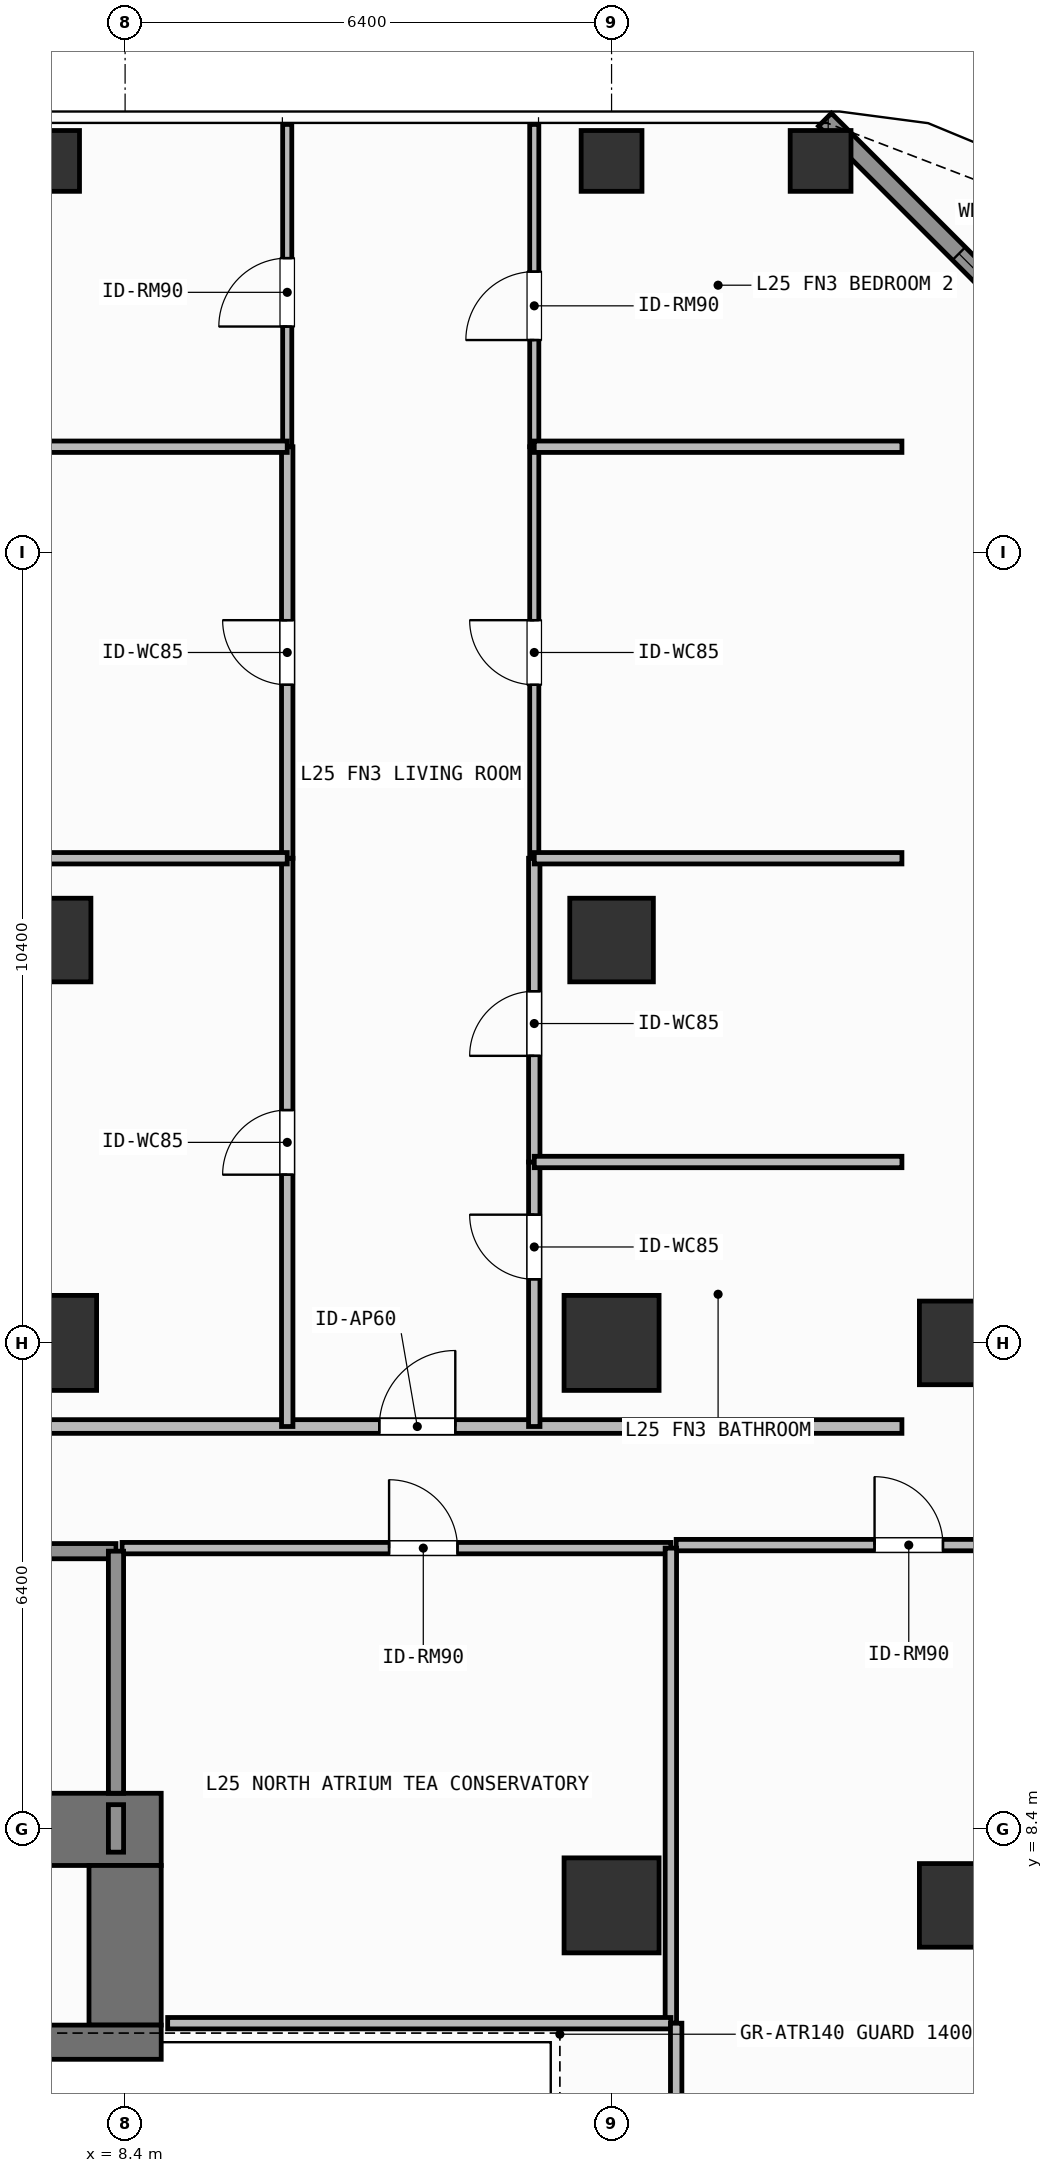
"""IFC4 building model, lengths in metres.
Left out: names, types, materials, properties, quantities, classifications, styles, units other than length and angle.
Written with IfcOpenShell. Run it as: python <this file> out.ifc"""

import sys

from ifc_helpers import new_model, si_unit, direction, frame, frame_2d, origin, origin_2d, place, context, subcontext, project, spatial, rectangle, hollow_rectangle, extrude, element, fill, save


model = new_model("IFC4")
c1 = context("Model", 3, precision=1e-05, world=origin(), true_north=direction((0.0, 1.0)))
c2 = subcontext(c1, "Body", "Model", "MODEL_VIEW")
j1 = project(units=[si_unit("LENGTHUNIT", "METRE"), si_unit("PLANEANGLEUNIT", "RADIAN")], contexts=[c1])
p1 = place(None, origin())
s1 = spatial("IfcSite", under=j1, at=p1, CompositionType="ELEMENT")
p2 = place(p1, origin())
s2 = spatial("IfcBuilding", under=s1, at=p2, CompositionType="ELEMENT")
p3 = place(p2, frame((0.0, 0.0, 100.8)))
s3 = spatial("IfcBuildingStorey", under=s2, at=p3, CompositionType="ELEMENT", Elevation=100.8)
p4 = place(p3, frame((-7.55, 8.4, 0.0), z_axis=(0.0, 0.0, 1.0), x_axis=(1.0, 0.0, 0.0)))
e1 = element("IfcWall", 1, at=p4, inside=s3, PredefinedType="SHEAR", context=c2, shape_type="SweptSolid", body=[
    extrude(rectangle(XDim=16.425, YDim=0.95, at=frame_2d((8.212, 0.0))), origin(), (0.0, 0.0, 1.0), 3.9),
])
p5 = place(p3, frame((8.4, 5.825, 0.0), z_axis=(0.0, 0.0, 1.0), x_axis=(0.0, 1.0, 0.0)))
e2 = element("IfcWall", 2, at=p5, inside=s3, PredefinedType="SHEAR", context=c2, shape_type="SweptSolid", body=[
    extrude(rectangle(XDim=2.1, YDim=0.95, at=frame_2d((1.05, 0.0))), origin(), (0.0, 0.0, 1.0), 3.9),
])
p6 = place(p3, frame((3.045, 5.6, 0.0), z_axis=(0.0, 0.0, 1.0), x_axis=(1.0, 0.0, 0.0)))
e3 = element("IfcWall", 3, at=p6, inside=s3, PredefinedType="SHEAR", context=c2, shape_type="SweptSolid", body=[
    extrude(rectangle(XDim=5.83, YDim=0.45, at=frame_2d((2.915, 0.0))), origin(), (0.0, 0.0, 1.0), 3.9),
])
for number, where, z_axis, x_axis in (
    (4, (7.4, 14.8, 0.0), (0.0, 0.0, 1.0), (1.0, 0.0, 0.0)),
    (5, (14.8, 14.8, 0.0), (0.0, 0.0, 1.0), (1.0, 0.0, 0.0)),
    (6, (14.8, 7.4, 0.0), (0.0, 0.0, 1.0), (1.0, 0.0, 0.0)),
):
    element("IfcColumn", number, at=place(p3, frame(where, z_axis=z_axis, x_axis=x_axis)), inside=s3, PredefinedType="COLUMN", context=c2, shape_type="SweptSolid", body=[
        extrude(rectangle(XDim=1.25, YDim=1.25, at=origin_2d()), origin(), (0.0, 0.0, 1.0), 3.9),
    ])
for number, where, z_axis, x_axis in (
    (7, (19.4, 7.4, 0.0), (0.0, 0.0, 1.0), (1.0, 0.0, 0.0)),
    (8, (19.4, 14.8, 0.0), (0.0, 0.0, 1.0), (1.0, 0.0, 0.0)),
    (9, (7.4, 20.1, 0.0), (0.0, 0.0, 1.0), (1.0, 0.0, 0.0)),
    (10, (14.8, 20.1, 0.0), (0.0, 0.0, 1.0), (1.0, 0.0, 0.0)),
):
    element("IfcColumn", number, at=place(p3, frame(where, z_axis=z_axis, x_axis=x_axis)), inside=s3, PredefinedType="COLUMN", context=c2, shape_type="SweptSolid", body=[
        extrude(rectangle(XDim=1.1, YDim=1.1, at=origin_2d()), origin(), (0.0, 0.0, 1.0), 3.9),
    ])
for number, where, z_axis, x_axis in (
    (11, (17.55, 30.35, 0.0), (0.0, 0.0, 1.0), (1.0, 0.0, 0.0)),
    (12, (7.4, 30.35, 0.0), (0.0, 0.0, 1.0), (1.0, 0.0, 0.0)),
    (13, (14.8, 30.35, 0.0), (0.0, 0.0, 1.0), (1.0, 0.0, 0.0)),
):
    element("IfcColumn", number, at=place(p3, frame(where, z_axis=z_axis, x_axis=x_axis)), inside=s3, PredefinedType="COLUMN", context=c2, shape_type="SweptSolid", body=[
        extrude(hollow_rectangle(XDim=0.8, YDim=0.8, WallThickness=0.036, at=origin_2d()), origin(), (0.0, 0.0, 1.0), 3.9),
    ])
p7 = place(p3, frame((17.608, 30.892, 0.0), z_axis=(0.0, 0.0, 1.0), x_axis=(0.707106781187, -0.707106781187, 0.0)))
e14 = element("IfcWall", 14, at=p7, inside=s3, PredefinedType="SOLIDWALL", context=c2, shape_type="SweptSolid", body=[
    extrude(rectangle(XDim=6.484, YDim=0.24, at=frame_2d((3.242, 0.0))), origin(), (0.0, 0.0, 1.0), 3.68),
])
p8 = place(p7, frame((2.492, 0.0, 0.8)))
e15 = element("IfcOpeningElement", 15, at=p8, cuts=e14, PredefinedType="OPENING", context=c2, shape_type="SweptSolid", body=[
    extrude(rectangle(XDim=1.5, YDim=1.85, at=frame_2d((0.75, 0.925))), frame((0.0, 0.13, 0.0), z_axis=(0.0, -1.0, 0.0), x_axis=(1.0, 0.0, 0.0)), (0.0, 0.0, 1.0), 0.26),
])
p9 = place(p3, frame((4.58, 12.06, 0.0), z_axis=(0.0, 0.0, 1.0), x_axis=(1.0, 0.0, 0.0)))
e16 = element("IfcWall", 16, at=p9, inside=s3, PredefinedType="SOLIDWALL", context=c2, shape_type="SweptSolid", body=[
    extrude(rectangle(XDim=3.7, YDim=0.2, at=frame_2d((1.85, 0.0))), origin(), (0.0, 0.0, 1.0), 3.68),
])
p10 = place(p9, frame((1.212, 0.0, 0.0)))
e17 = element("IfcOpeningElement", 17, at=p10, cuts=e16, PredefinedType="OPENING", context=c2, shape_type="SweptSolid", body=[
    extrude(rectangle(XDim=1.1, YDim=2.15, at=frame_2d((0.55, 1.075))), frame((0.0, 0.11, 0.0), z_axis=(0.0, -1.0, 0.0), x_axis=(1.0, 0.0, 0.0)), (0.0, 0.0, 1.0), 0.22),
])
p11 = place(p3, frame((8.36, 12.1, 0.0), z_axis=(0.0, 0.0, 1.0), x_axis=(1.0, 0.0, 0.0)))
e18 = element("IfcWall", 18, at=p11, inside=s3, PredefinedType="PARTITIONING", context=c2, shape_type="SweptSolid", body=[
    extrude(rectangle(XDim=7.22, YDim=0.15, at=frame_2d((3.61, 0.0))), origin(), (0.0, 0.0, 1.0), 3.68),
])
p12 = place(p11, frame((3.513, 0.0, 0.0)))
e19 = element("IfcOpeningElement", 19, at=p12, cuts=e18, PredefinedType="OPENING", context=c2, shape_type="SweptSolid", body=[
    extrude(rectangle(XDim=0.9, YDim=2.1, at=frame_2d((0.45, 1.05))), frame((0.0, 0.085, 0.0), z_axis=(0.0, -1.0, 0.0), x_axis=(1.0, 0.0, 0.0)), (0.0, 0.0, 1.0), 0.17),
])
p13 = place(p3, frame((6.404, 13.7, 0.0), z_axis=(0.0, 0.0, 1.0), x_axis=(1.0, 0.0, 0.0)))
e20 = element("IfcWall", 20, at=p13, inside=s3, PredefinedType="PARTITIONING", context=c2, shape_type="SweptSolid", body=[
    extrude(rectangle(XDim=12.216, YDim=0.18, at=frame_2d((6.108, 0.0))), origin(), (0.0, 0.0, 1.0), 3.68),
])
p14 = place(p13, frame((5.34, 0.0, 0.0)))
e21 = element("IfcOpeningElement", 21, at=p14, cuts=e20, PredefinedType="OPENING", context=c2, shape_type="SweptSolid", body=[
    extrude(rectangle(XDim=1.0, YDim=2.2, at=frame_2d((0.5, 1.1))), frame((0.0, 0.1, 0.0), z_axis=(0.0, -1.0, 0.0), x_axis=(1.0, 0.0, 0.0)), (0.0, 0.0, 1.0), 0.2),
])
p15 = place(p3, frame((10.533, 13.7, 0.0), z_axis=(0.0, 0.0, 1.0), x_axis=(0.0, 1.0, 0.0)))
e22 = element("IfcWall", 22, at=p15, inside=s3, PredefinedType="PARTITIONING", context=c2, shape_type="SweptSolid", body=[
    extrude(rectangle(XDim=7.476, YDim=0.15, at=frame_2d((3.738, 0.0))), origin(), (0.0, 0.0, 1.0), 3.68),
])
p16 = place(p15, frame((3.313, 0.0, 0.0)))
e23 = element("IfcOpeningElement", 23, at=p16, cuts=e22, PredefinedType="OPENING", context=c2, shape_type="SweptSolid", body=[
    extrude(rectangle(XDim=0.85, YDim=2.1, at=frame_2d((0.425, 1.05))), frame((0.0, 0.085, 0.0), z_axis=(0.0, -1.0, 0.0), x_axis=(1.0, 0.0, 0.0)), (0.0, 0.0, 1.0), 0.17),
])
p17 = place(p3, frame((10.533, 21.176, 0.0), z_axis=(0.0, 0.0, 1.0), x_axis=(0.0, 1.0, 0.0)))
e24 = element("IfcWall", 24, at=p17, inside=s3, PredefinedType="PARTITIONING", context=c2, shape_type="SweptSolid", body=[
    extrude(rectangle(XDim=5.414, YDim=0.15, at=frame_2d((2.707, 0.0))), origin(), (0.0, 0.0, 1.0), 3.68),
])
p18 = place(p17, frame((2.282, 0.0, 0.0)))
e25 = element("IfcOpeningElement", 25, at=p18, cuts=e24, PredefinedType="OPENING", context=c2, shape_type="SweptSolid", body=[
    extrude(rectangle(XDim=0.85, YDim=2.1, at=frame_2d((0.425, 1.05))), frame((0.0, 0.085, 0.0), z_axis=(0.0, -1.0, 0.0), x_axis=(1.0, 0.0, 0.0)), (0.0, 0.0, 1.0), 0.17),
])
p19 = place(p3, frame((10.533, 26.59, 0.0), z_axis=(0.0, 0.0, 1.0), x_axis=(0.0, 1.0, 0.0)))
e26 = element("IfcWall", 26, at=p19, inside=s3, PredefinedType="PARTITIONING", context=c2, shape_type="SweptSolid", body=[
    extrude(rectangle(XDim=4.24, YDim=0.12, at=frame_2d((2.12, 0.0))), origin(), (0.0, 0.0, 1.0), 3.68),
])
p20 = place(p19, frame((1.581, 0.0, 0.0)))
e27 = element("IfcOpeningElement", 27, at=p20, cuts=e26, PredefinedType="OPENING", context=c2, shape_type="SweptSolid", body=[
    extrude(rectangle(XDim=0.9, YDim=2.1, at=frame_2d((0.45, 1.05))), frame((0.0, 0.07, 0.0), z_axis=(0.0, -1.0, 0.0), x_axis=(1.0, 0.0, 0.0)), (0.0, 0.0, 1.0), 0.14),
])
p21 = place(p3, frame((13.783, 13.7, 0.0), z_axis=(0.0, 0.0, 1.0), x_axis=(0.0, 1.0, 0.0)))
e28 = element("IfcWall", 28, at=p21, inside=s3, PredefinedType="PARTITIONING", context=c2, shape_type="SweptSolid", body=[
    extrude(rectangle(XDim=3.48, YDim=0.15, at=frame_2d((1.74, 0.0))), origin(), (0.0, 0.0, 1.0), 3.68),
])
p22 = place(p21, frame((1.937, 0.0, 0.0)))
e29 = element("IfcOpeningElement", 29, at=p22, cuts=e28, PredefinedType="OPENING", context=c2, shape_type="SweptSolid", body=[
    extrude(rectangle(XDim=0.85, YDim=2.1, at=frame_2d((0.425, 1.05))), frame((0.0, 0.085, 0.0), z_axis=(0.0, -1.0, 0.0), x_axis=(1.0, 0.0, 0.0)), (0.0, 0.0, 1.0), 0.17),
])
p23 = place(p3, frame((13.783, 17.18, 0.0), z_axis=(0.0, 0.0, 1.0), x_axis=(0.0, 1.0, 0.0)))
e30 = element("IfcWall", 30, at=p23, inside=s3, PredefinedType="PARTITIONING", context=c2, shape_type="SweptSolid", body=[
    extrude(rectangle(XDim=3.996, YDim=0.15, at=frame_2d((1.998, 0.0))), origin(), (0.0, 0.0, 1.0), 3.68),
])
p24 = place(p23, frame((1.396, 0.0, 0.0)))
e31 = element("IfcOpeningElement", 31, at=p24, cuts=e30, PredefinedType="OPENING", context=c2, shape_type="SweptSolid", body=[
    extrude(rectangle(XDim=0.85, YDim=2.1, at=frame_2d((0.425, 1.05))), frame((0.0, 0.085, 0.0), z_axis=(0.0, -1.0, 0.0), x_axis=(1.0, 0.0, 0.0)), (0.0, 0.0, 1.0), 0.17),
])
p25 = place(p3, frame((13.783, 21.176, 0.0), z_axis=(0.0, 0.0, 1.0), x_axis=(0.0, 1.0, 0.0)))
e32 = element("IfcWall", 32, at=p25, inside=s3, PredefinedType="PARTITIONING", context=c2, shape_type="SweptSolid", body=[
    extrude(rectangle(XDim=5.414, YDim=0.12, at=frame_2d((2.707, 0.0))), origin(), (0.0, 0.0, 1.0), 3.68),
])
p26 = place(p25, frame((2.282, 0.0, 0.0)))
e33 = element("IfcOpeningElement", 33, at=p26, cuts=e32, PredefinedType="OPENING", context=c2, shape_type="SweptSolid", body=[
    extrude(rectangle(XDim=0.85, YDim=2.1, at=frame_2d((0.425, 1.05))), frame((0.0, 0.07, 0.0), z_axis=(0.0, -1.0, 0.0), x_axis=(1.0, 0.0, 0.0)), (0.0, 0.0, 1.0), 0.14),
])
p27 = place(p3, frame((13.783, 26.59, 0.0), z_axis=(0.0, 0.0, 1.0), x_axis=(0.0, 1.0, 0.0)))
e34 = element("IfcWall", 34, at=p27, inside=s3, PredefinedType="PARTITIONING", context=c2, shape_type="SweptSolid", body=[
    extrude(rectangle(XDim=4.24, YDim=0.12, at=frame_2d((2.12, 0.0))), origin(), (0.0, 0.0, 1.0), 3.68),
])
p28 = place(p27, frame((1.404, 0.0, 0.0)))
e35 = element("IfcOpeningElement", 35, at=p28, cuts=e34, PredefinedType="OPENING", context=c2, shape_type="SweptSolid", body=[
    extrude(rectangle(XDim=0.9, YDim=2.1, at=frame_2d((0.45, 1.05))), frame((0.0, 0.07, 0.0), z_axis=(0.0, -1.0, 0.0), x_axis=(1.0, 0.0, 0.0)), (0.0, 0.0, 1.0), 0.14),
])
p29 = place(p3, frame((15.65, 12.14, 0.0), z_axis=(0.0, 0.0, 1.0), x_axis=(1.0, 0.0, 0.0)))
e36 = element("IfcWall", 36, at=p29, inside=s3, PredefinedType="PARTITIONING", context=c2, shape_type="SweptSolid", body=[
    extrude(rectangle(XDim=6.47, YDim=0.15, at=frame_2d((3.235, 0.0))), origin(), (0.0, 0.0, 1.0), 3.68),
])
p30 = place(p29, frame((2.61, 0.0, 0.0)))
e37 = element("IfcOpeningElement", 37, at=p30, cuts=e36, PredefinedType="OPENING", context=c2, shape_type="SweptSolid", body=[
    extrude(rectangle(XDim=0.9, YDim=2.1, at=frame_2d((0.45, 1.05))), frame((0.0, 0.085, 0.0), z_axis=(0.0, -1.0, 0.0), x_axis=(1.0, 0.0, 0.0)), (0.0, 0.0, 1.0), 0.17),
])
p31 = place(p3, frame((8.28, 8.875, 0.0), z_axis=(0.0, 0.0, 1.0), x_axis=(0.0, 1.0, 0.0)))
e38 = element("IfcWall", 38, at=p31, inside=s3, PredefinedType="SOLIDWALL", context=c2, shape_type="SweptSolid", body=[
    extrude(rectangle(XDim=3.185, YDim=0.2, at=frame_2d((1.593, 0.0))), origin(), (0.0, 0.0, 1.0), 3.68),
])
p32 = place(p3, frame((8.28, 8.1, 0.0), z_axis=(0.0, 0.0, 1.0), x_axis=(0.0, 1.0, 0.0)))
e39 = element("IfcWall", 39, at=p32, inside=s3, PredefinedType="SOLIDWALL", context=c2, shape_type="SweptSolid", body=[
    extrude(rectangle(XDim=0.625, YDim=0.2, at=frame_2d((0.312, 0.0))), origin(), (0.0, 0.0, 1.0), 3.68),
])
p33 = place(p3, frame((15.58, 5.85, 0.0), z_axis=(0.0, 0.0, 1.0), x_axis=(0.0, 1.0, 0.0)))
e40 = element("IfcWall", 40, at=p33, inside=s3, PredefinedType="PARTITIONING", context=c2, shape_type="SweptSolid", body=[
    extrude(rectangle(XDim=6.25, YDim=0.15, at=frame_2d((3.125, 0.0))), origin(), (0.0, 0.0, 1.0), 3.68),
])
p34 = place(p3, frame((8.96, 5.85, 0.0), z_axis=(0.0, 0.0, 1.0), x_axis=(1.0, 0.0, 0.0)))
e41 = element("IfcWall", 41, at=p34, inside=s3, PredefinedType="PARTITIONING", context=c2, shape_type="SweptSolid", body=[
    extrude(rectangle(XDim=6.62, YDim=0.15, at=frame_2d((3.31, 0.0))), origin(), (0.0, 0.0, 1.0), 3.68),
])
for number, where, z_axis, x_axis in (
    (42, (6.404, 21.176, 0.0), (0.0, 0.0, 1.0), (1.0, 0.0, 0.0)),
    (43, (6.404, 26.59, 0.0), (0.0, 0.0, 1.0), (1.0, 0.0, 0.0)),
):
    element("IfcWall", number, at=place(p3, frame(where, z_axis=z_axis, x_axis=x_axis)), inside=s3, PredefinedType="PARTITIONING", context=c2, shape_type="SweptSolid", body=[
        extrude(rectangle(XDim=4.129, YDim=0.15, at=frame_2d((2.064, 0.0))), origin(), (0.0, 0.0, 1.0), 3.68),
    ])
for number, where, z_axis, x_axis in (
    (44, (13.783, 17.18, 0.0), (0.0, 0.0, 1.0), (1.0, 0.0, 0.0)),
    (45, (13.783, 21.176, 0.0), (0.0, 0.0, 1.0), (1.0, 0.0, 0.0)),
    (46, (13.783, 26.59, 0.0), (0.0, 0.0, 1.0), (1.0, 0.0, 0.0)),
):
    element("IfcWall", number, at=place(p3, frame(where, z_axis=z_axis, x_axis=x_axis)), inside=s3, PredefinedType="PARTITIONING", context=c2, shape_type="SweptSolid", body=[
        extrude(rectangle(XDim=4.837, YDim=0.15, at=frame_2d((2.418, 0.0))), origin(), (0.0, 0.0, 1.0), 3.68),
    ])
p35 = place(p3, frame((15.65, -2.75, 0.0), z_axis=(0.0, 0.0, 1.0), x_axis=(0.0, 1.0, 0.0)))
e47 = element("IfcWall", 47, at=p35, inside=s3, PredefinedType="PARTITIONING", context=c2, shape_type="SweptSolid", body=[
    extrude(rectangle(XDim=8.6, YDim=0.15, at=frame_2d((4.3, 0.0))), origin(), (0.0, 0.0, 1.0), 3.68),
])
p36 = place(p8, origin())
e48 = element("IfcWindow", 48, at=p36, inside=s3, PartitioningType="SINGLE_PANEL", PredefinedType="WINDOW", context=c2, shape_type="SweptSolid", body=[
    extrude(rectangle(XDim=1.5, YDim=1.85, at=frame_2d((0.75, 0.925))), frame((0.0, 0.03, 0.0), z_axis=(0.0, -1.0, 0.0), x_axis=(1.0, 0.0, 0.0)), (0.0, 0.0, 1.0), 0.06),
])
fill(e15, e48)
p37 = place(p12, origin())
e49 = element("IfcDoor", 49, at=p37, inside=s3, OperationType="SINGLE_SWING_LEFT", PredefinedType="DOOR", context=c2, shape_type="SweptSolid", body=[
    extrude(rectangle(XDim=0.9, YDim=2.1, at=frame_2d((0.45, 1.05))), frame((0.0, 0.025, 0.0), z_axis=(0.0, -1.0, 0.0), x_axis=(1.0, 0.0, 0.0)), (0.0, 0.0, 1.0), 0.05),
])
fill(e19, e49)
p38 = place(p14, origin())
e50 = element("IfcDoor", 50, at=p38, inside=s3, OperationType="SINGLE_SWING_RIGHT", PredefinedType="DOOR", context=c2, shape_type="SweptSolid", body=[
    extrude(rectangle(XDim=1.0, YDim=2.2, at=frame_2d((0.5, 1.1))), frame((0.0, 0.025, 0.0), z_axis=(0.0, -1.0, 0.0), x_axis=(1.0, 0.0, 0.0)), (0.0, 0.0, 1.0), 0.05),
])
fill(e21, e50)
p39 = place(p16, origin())
e51 = element("IfcDoor", 51, at=p39, inside=s3, OperationType="SINGLE_SWING_LEFT", PredefinedType="DOOR", context=c2, shape_type="SweptSolid", body=[
    extrude(rectangle(XDim=0.85, YDim=2.1, at=frame_2d((0.425, 1.05))), frame((0.0, 0.025, 0.0), z_axis=(0.0, -1.0, 0.0), x_axis=(1.0, 0.0, 0.0)), (0.0, 0.0, 1.0), 0.05),
])
fill(e23, e51)
p40 = place(p18, origin())
e52 = element("IfcDoor", 52, at=p40, inside=s3, OperationType="SINGLE_SWING_RIGHT", PredefinedType="DOOR", context=c2, shape_type="SweptSolid", body=[
    extrude(rectangle(XDim=0.85, YDim=2.1, at=frame_2d((0.425, 1.05))), frame((0.0, 0.025, 0.0), z_axis=(0.0, -1.0, 0.0), x_axis=(1.0, 0.0, 0.0)), (0.0, 0.0, 1.0), 0.05),
])
fill(e25, e52)
p41 = place(p20, origin())
e53 = element("IfcDoor", 53, at=p41, inside=s3, OperationType="SINGLE_SWING_LEFT", PredefinedType="DOOR", context=c2, shape_type="SweptSolid", body=[
    extrude(rectangle(XDim=0.9, YDim=2.1, at=frame_2d((0.45, 1.05))), frame((0.0, 0.025, 0.0), z_axis=(0.0, -1.0, 0.0), x_axis=(1.0, 0.0, 0.0)), (0.0, 0.0, 1.0), 0.05),
])
fill(e27, e53)
p42 = place(p22, origin())
e54 = element("IfcDoor", 54, at=p42, inside=s3, OperationType="SINGLE_SWING_RIGHT", PredefinedType="DOOR", context=c2, shape_type="SweptSolid", body=[
    extrude(rectangle(XDim=0.85, YDim=2.1, at=frame_2d((0.425, 1.05))), frame((0.0, 0.025, 0.0), z_axis=(0.0, -1.0, 0.0), x_axis=(1.0, 0.0, 0.0)), (0.0, 0.0, 1.0), 0.05),
])
fill(e29, e54)
p43 = place(p24, origin())
e55 = element("IfcDoor", 55, at=p43, inside=s3, OperationType="SINGLE_SWING_LEFT", PredefinedType="DOOR", context=c2, shape_type="SweptSolid", body=[
    extrude(rectangle(XDim=0.85, YDim=2.1, at=frame_2d((0.425, 1.05))), frame((0.0, 0.025, 0.0), z_axis=(0.0, -1.0, 0.0), x_axis=(1.0, 0.0, 0.0)), (0.0, 0.0, 1.0), 0.05),
])
fill(e31, e55)
p44 = place(p26, origin())
e56 = element("IfcDoor", 56, at=p44, inside=s3, OperationType="SINGLE_SWING_RIGHT", PredefinedType="DOOR", context=c2, shape_type="SweptSolid", body=[
    extrude(rectangle(XDim=0.85, YDim=2.1, at=frame_2d((0.425, 1.05))), frame((0.0, 0.025, 0.0), z_axis=(0.0, -1.0, 0.0), x_axis=(1.0, 0.0, 0.0)), (0.0, 0.0, 1.0), 0.05),
])
fill(e33, e56)
p45 = place(p28, origin())
e57 = element("IfcDoor", 57, at=p45, inside=s3, OperationType="SINGLE_SWING_LEFT", PredefinedType="DOOR", context=c2, shape_type="SweptSolid", body=[
    extrude(rectangle(XDim=0.9, YDim=2.1, at=frame_2d((0.45, 1.05))), frame((0.0, 0.025, 0.0), z_axis=(0.0, -1.0, 0.0), x_axis=(1.0, 0.0, 0.0)), (0.0, 0.0, 1.0), 0.05),
])
fill(e35, e57)
p46 = place(p30, origin())
e58 = element("IfcDoor", 58, at=p46, inside=s3, OperationType="SINGLE_SWING_LEFT", PredefinedType="DOOR", context=c2, shape_type="SweptSolid", body=[
    extrude(rectangle(XDim=0.9, YDim=2.1, at=frame_2d((0.45, 1.05))), frame((0.0, 0.025, 0.0), z_axis=(0.0, -1.0, 0.0), x_axis=(1.0, 0.0, 0.0)), (0.0, 0.0, 1.0), 0.05),
])
fill(e37, e58)
save(model, sys.argv[1])
